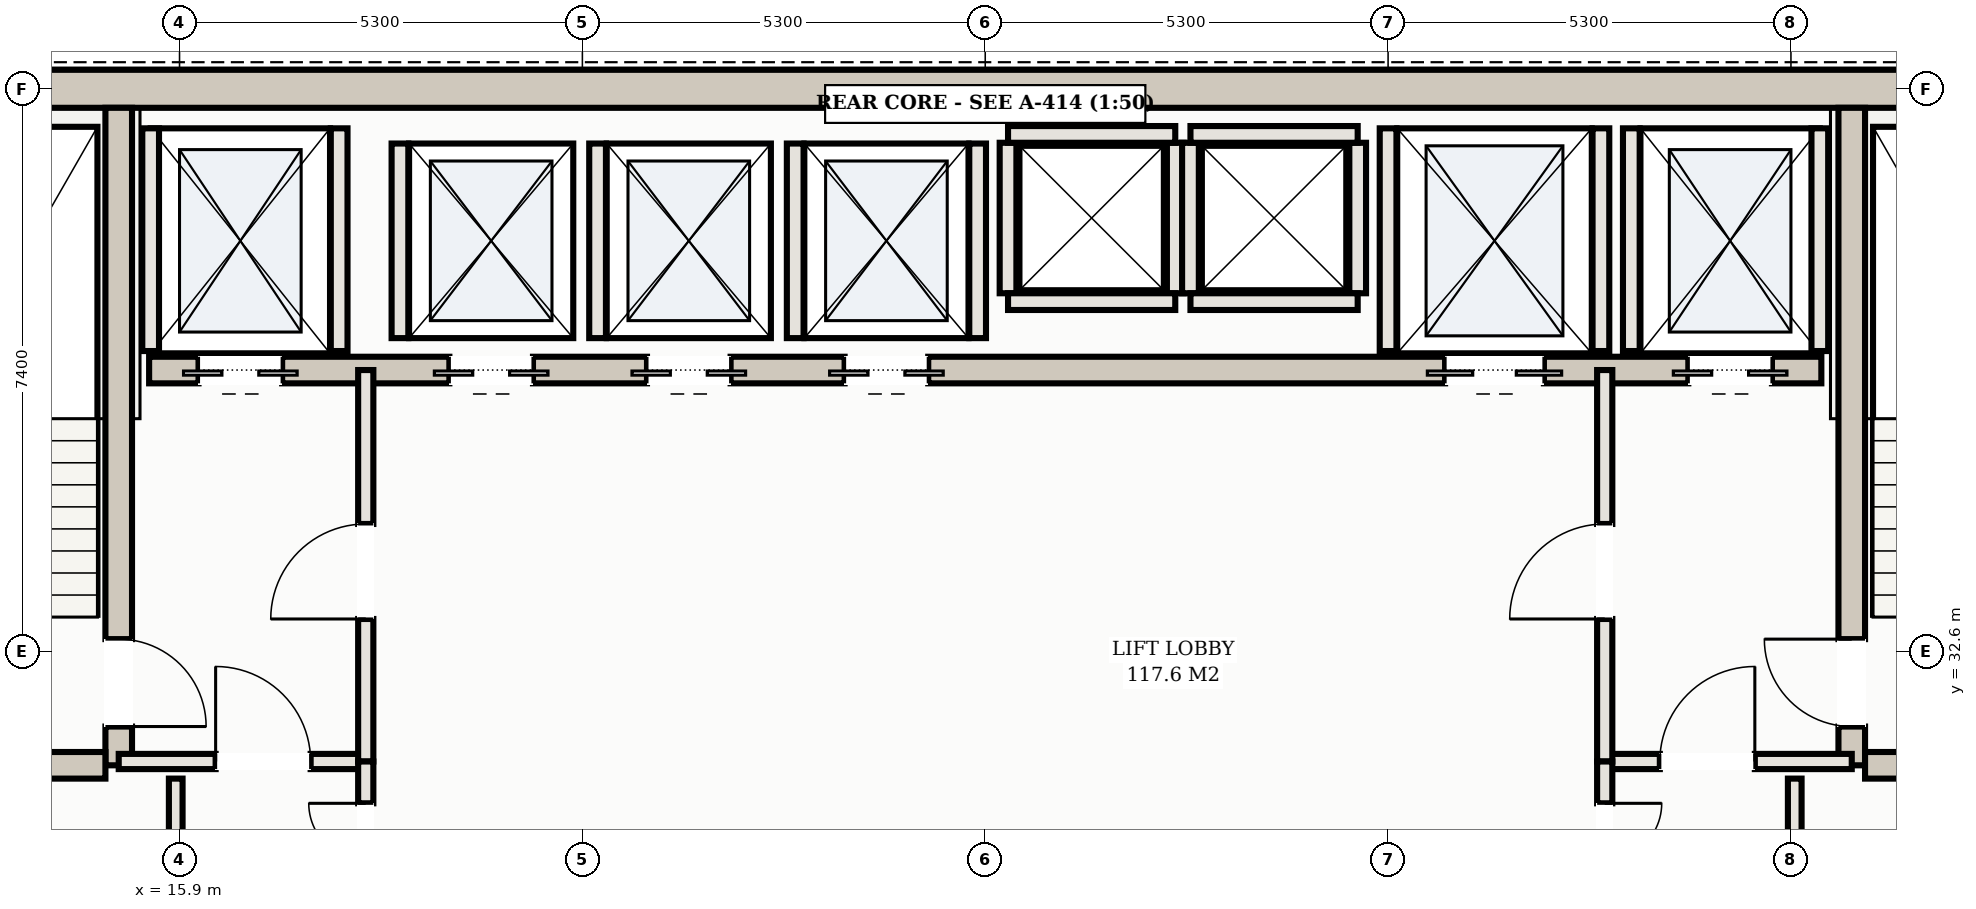
"""IFC4 building model, lengths in metres.
Left out: names, types, materials, properties, quantities, classifications, styles, units other than length and angle.
Written with IfcOpenShell. Run it as: python <this file> out.ifc"""

import sys

from ifc_helpers import new_model, si_unit, direction, frame, frame_2d, origin, place, context, subcontext, project, spatial, rectangle, extrude, element, fill, save


model = new_model("IFC4")
c1 = context("Model", 3, precision=1e-05, world=origin(), true_north=direction((0.0, 1.0)))
c2 = subcontext(c1, "Body", "Model", "MODEL_VIEW")
j1 = project(units=[si_unit("LENGTHUNIT", "METRE"), si_unit("PLANEANGLEUNIT", "RADIAN")], contexts=[c1])
p1 = place(None, origin())
s1 = spatial("IfcSite", under=j1, at=p1, CompositionType="ELEMENT")
p2 = place(p1, origin())
s2 = spatial("IfcBuilding", under=s1, at=p2, CompositionType="ELEMENT")
p3 = place(p2, frame((0.0, 0.0, 259.4)))
s3 = spatial("IfcBuildingStorey", under=s2, at=p3, CompositionType="ELEMENT", Elevation=259.4)
p4 = place(p3, frame((10.35, 40.0, 0.0), z_axis=(0.0, 0.0, 1.0), x_axis=(1.0, 0.0, 0.0)))
e1 = element("IfcWall", 1, at=p4, inside=s3, PredefinedType="SHEAR", context=c2, shape_type="SweptSolid", body=[
    extrude(rectangle(XDim=32.3, YDim=0.5, at=frame_2d((16.15, 0.0))), origin(), (0.0, 0.0, 1.0), 3.11),
])
p5 = place(p3, frame((15.1, 31.1, 0.0), z_axis=(0.0, 0.0, 1.0), x_axis=(0.0, 1.0, 0.0)))
e2 = element("IfcWall", 2, at=p5, inside=s3, PredefinedType="SHEAR", context=c2, shape_type="SweptSolid", body=[
    extrude(rectangle(XDim=8.65, YDim=0.35, at=frame_2d((4.325, 0.0))), origin(), (0.0, 0.0, 1.0), 3.11),
])
p6 = place(p5, frame((0.51, 0.0, 0.0)))
e3 = element("IfcOpeningElement", 3, at=p6, cuts=e2, PredefinedType="OPENING", context=c2, shape_type="SweptSolid", body=[
    extrude(rectangle(XDim=1.15, YDim=2.2, at=frame_2d((0.575, 1.1))), frame((0.0, 0.185, 0.0), z_axis=(0.0, -1.0, 0.0), x_axis=(1.0, 0.0, 0.0)), (0.0, 0.0, 1.0), 0.37),
])
p7 = place(p3, frame((10.85, 31.1, 0.0), z_axis=(0.0, 0.0, 1.0), x_axis=(1.0, 0.0, 0.0)))
e4 = element("IfcWall", 4, at=p7, inside=s3, PredefinedType="SHEAR", context=c2, shape_type="SweptSolid", body=[
    extrude(rectangle(XDim=4.075, YDim=0.35, at=frame_2d((2.038, 0.0))), origin(), (0.0, 0.0, 1.0), 3.11),
])
p8 = place(p3, frame((37.9, 31.1, 0.0), z_axis=(0.0, 0.0, 1.0), x_axis=(0.0, 1.0, 0.0)))
e5 = element("IfcWall", 5, at=p8, inside=s3, PredefinedType="SHEAR", context=c2, shape_type="SweptSolid", body=[
    extrude(rectangle(XDim=8.65, YDim=0.35, at=frame_2d((4.325, 0.0))), origin(), (0.0, 0.0, 1.0), 3.11),
])
p9 = place(p8, frame((0.51, 0.0, 0.0)))
e6 = element("IfcOpeningElement", 6, at=p9, cuts=e5, PredefinedType="OPENING", context=c2, shape_type="SweptSolid", body=[
    extrude(rectangle(XDim=1.15, YDim=2.2, at=frame_2d((0.575, 1.1))), frame((0.0, 0.185, 0.0), z_axis=(0.0, -1.0, 0.0), x_axis=(1.0, 0.0, 0.0)), (0.0, 0.0, 1.0), 0.37),
])
p10 = place(p3, frame((38.075, 31.1, 0.0), z_axis=(0.0, 0.0, 1.0), x_axis=(1.0, 0.0, 0.0)))
e7 = element("IfcWall", 7, at=p10, inside=s3, PredefinedType="SHEAR", context=c2, shape_type="SweptSolid", body=[
    extrude(rectangle(XDim=4.075, YDim=0.35, at=frame_2d((2.038, 0.0))), origin(), (0.0, 0.0, 1.0), 3.11),
])
p11 = place(p3, frame((15.5, 36.3, 0.0), z_axis=(0.0, 0.0, 1.0), x_axis=(1.0, 0.0, 0.0)))
e8 = element("IfcWall", 8, at=p11, inside=s3, PredefinedType="SHEAR", context=c2, shape_type="SweptSolid", body=[
    extrude(rectangle(XDim=22.0, YDim=0.35, at=frame_2d((11.0, 0.0))), origin(), (0.0, 0.0, 1.0), 3.11),
])
p12 = place(p11, frame((0.65, 0.0, 0.0)))
e9 = element("IfcOpeningElement", 9, at=p12, cuts=e8, PredefinedType="OPENING", context=c2, shape_type="SweptSolid", body=[
    extrude(rectangle(XDim=1.1, YDim=2.15, at=frame_2d((0.55, 1.075))), frame((0.0, 0.185, 0.0), z_axis=(0.0, -1.0, 0.0), x_axis=(1.0, 0.0, 0.0)), (0.0, 0.0, 1.0), 0.37),
])
p13 = place(p11, frame((20.25, 0.0, 0.0)))
e10 = element("IfcOpeningElement", 10, at=p13, cuts=e8, PredefinedType="OPENING", context=c2, shape_type="SweptSolid", body=[
    extrude(rectangle(XDim=1.1, YDim=2.15, at=frame_2d((0.55, 1.075))), frame((0.0, 0.185, 0.0), z_axis=(0.0, -1.0, 0.0), x_axis=(1.0, 0.0, 0.0)), (0.0, 0.0, 1.0), 0.37),
])
p14 = place(p11, frame((17.05, 0.0, 0.0)))
e11 = element("IfcOpeningElement", 11, at=p14, cuts=e8, PredefinedType="OPENING", context=c2, shape_type="SweptSolid", body=[
    extrude(rectangle(XDim=1.3, YDim=2.2, at=frame_2d((0.65, 1.1))), frame((0.0, 0.185, 0.0), z_axis=(0.0, -1.0, 0.0), x_axis=(1.0, 0.0, 0.0)), (0.0, 0.0, 1.0), 0.37),
])
p15 = place(p11, frame((3.95, 0.0, 0.0)))
e12 = element("IfcOpeningElement", 12, at=p15, cuts=e8, PredefinedType="OPENING", context=c2, shape_type="SweptSolid", body=[
    extrude(rectangle(XDim=1.1, YDim=2.15, at=frame_2d((0.55, 1.075))), frame((0.0, 0.185, 0.0), z_axis=(0.0, -1.0, 0.0), x_axis=(1.0, 0.0, 0.0)), (0.0, 0.0, 1.0), 0.37),
])
p16 = place(p11, frame((6.55, 0.0, 0.0)))
e13 = element("IfcOpeningElement", 13, at=p16, cuts=e8, PredefinedType="OPENING", context=c2, shape_type="SweptSolid", body=[
    extrude(rectangle(XDim=1.1, YDim=2.15, at=frame_2d((0.55, 1.075))), frame((0.0, 0.185, 0.0), z_axis=(0.0, -1.0, 0.0), x_axis=(1.0, 0.0, 0.0)), (0.0, 0.0, 1.0), 0.37),
])
p17 = place(p11, frame((9.15, 0.0, 0.0)))
e14 = element("IfcOpeningElement", 14, at=p17, cuts=e8, PredefinedType="OPENING", context=c2, shape_type="SweptSolid", body=[
    extrude(rectangle(XDim=1.1, YDim=2.15, at=frame_2d((0.55, 1.075))), frame((0.0, 0.185, 0.0), z_axis=(0.0, -1.0, 0.0), x_axis=(1.0, 0.0, 0.0)), (0.0, 0.0, 1.0), 0.37),
])
for number, where, z_axis, x_axis in (
    (15, (15.52, 36.55, 0.0), (0.0, 0.0, 1.0), (0.0, 1.0, 0.0)),
    (16, (18.0, 36.55, 0.0), (0.0, 0.0, 1.0), (0.0, 1.0, 0.0)),
    (17, (35.0, 36.55, 0.0), (0.0, 0.0, 1.0), (0.0, 1.0, 0.0)),
    (18, (37.48, 36.55, 0.0), (0.0, 0.0, 1.0), (0.0, 1.0, 0.0)),
    (19, (31.8, 36.55, 0.0), (0.0, 0.0, 1.0), (0.0, 1.0, 0.0)),
    (20, (34.6, 36.55, 0.0), (0.0, 0.0, 1.0), (0.0, 1.0, 0.0)),
):
    element("IfcWall", number, at=place(p3, frame(where, z_axis=z_axis, x_axis=x_axis)), inside=s3, PredefinedType="SOLIDWALL", context=c2, shape_type="SweptSolid", body=[
        extrude(rectangle(XDim=2.93, YDim=0.22, at=frame_2d((1.465, 0.0))), origin(), (0.0, 0.0, 1.0), 3.11),
    ])
for number, where, z_axis, x_axis in (
    (21, (18.8, 36.72, 0.0), (0.0, 0.0, 1.0), (0.0, 1.0, 0.0)),
    (22, (21.4, 36.72, 0.0), (0.0, 0.0, 1.0), (0.0, 1.0, 0.0)),
    (23, (24.0, 36.72, 0.0), (0.0, 0.0, 1.0), (0.0, 1.0, 0.0)),
    (24, (26.4, 36.72, 0.0), (0.0, 0.0, 1.0), (0.0, 1.0, 0.0)),
):
    element("IfcWall", number, at=place(p3, frame(where, z_axis=z_axis, x_axis=x_axis)), inside=s3, PredefinedType="SOLIDWALL", context=c2, shape_type="SweptSolid", body=[
        extrude(rectangle(XDim=2.56, YDim=0.22, at=frame_2d((1.28, 0.0))), origin(), (0.0, 0.0, 1.0), 3.11),
    ])
for number, where, z_axis, x_axis in (
    (25, (26.8, 37.31, 0.0), (0.0, 0.0, 1.0), (0.0, 1.0, 0.0)),
    (26, (29.0, 37.31, 0.0), (0.0, 0.0, 1.0), (0.0, 1.0, 0.0)),
):
    element("IfcWall", number, at=place(p3, frame(where, z_axis=z_axis, x_axis=x_axis)), inside=s3, PredefinedType="SOLIDWALL", context=c2, shape_type="SweptSolid", body=[
        extrude(rectangle(XDim=1.98, YDim=0.22, at=frame_2d((0.99, 0.0))), origin(), (0.0, 0.0, 1.0), 3.11),
    ])
for number, where, z_axis, x_axis in (
    (27, (26.8, 39.4, 0.0), (0.0, 0.0, 1.0), (1.0, 0.0, 0.0)),
    (28, (26.8, 37.2, 0.0), (0.0, 0.0, 1.0), (1.0, 0.0, 0.0)),
):
    element("IfcWall", number, at=place(p3, frame(where, z_axis=z_axis, x_axis=x_axis)), inside=s3, PredefinedType="SOLIDWALL", context=c2, shape_type="SweptSolid", body=[
        extrude(rectangle(XDim=2.2, YDim=0.22, at=frame_2d((1.1, 0.0))), origin(), (0.0, 0.0, 1.0), 3.11),
    ])
for number, where, z_axis, x_axis in (
    (29, (29.2, 37.31, 0.0), (0.0, 0.0, 1.0), (0.0, 1.0, 0.0)),
    (30, (31.4, 37.31, 0.0), (0.0, 0.0, 1.0), (0.0, 1.0, 0.0)),
):
    element("IfcWall", number, at=place(p3, frame(where, z_axis=z_axis, x_axis=x_axis)), inside=s3, PredefinedType="SOLIDWALL", context=c2, shape_type="SweptSolid", body=[
        extrude(rectangle(XDim=1.98, YDim=0.22, at=frame_2d((0.99, 0.0))), origin(), (0.0, 0.0, 1.0), 3.11),
    ])
for number, where, z_axis, x_axis in (
    (31, (29.2, 39.4, 0.0), (0.0, 0.0, 1.0), (1.0, 0.0, 0.0)),
    (32, (29.2, 37.2, 0.0), (0.0, 0.0, 1.0), (1.0, 0.0, 0.0)),
):
    element("IfcWall", number, at=place(p3, frame(where, z_axis=z_axis, x_axis=x_axis)), inside=s3, PredefinedType="SOLIDWALL", context=c2, shape_type="SweptSolid", body=[
        extrude(rectangle(XDim=2.2, YDim=0.22, at=frame_2d((1.1, 0.0))), origin(), (0.0, 0.0, 1.0), 3.11),
    ])
p18 = place(p3, frame((15.1, 31.15, 0.0), z_axis=(0.0, 0.0, 1.0), x_axis=(1.0, 0.0, 0.0)))
e33 = element("IfcWall", 33, at=p18, inside=s3, PredefinedType="PARTITIONING", context=c2, shape_type="SweptSolid", body=[
    extrude(rectangle(XDim=3.25, YDim=0.2, at=frame_2d((1.625, 0.0))), origin(), (0.0, 0.0, 1.0), 2.45),
])
p19 = place(p18, frame((1.275, 0.0, 0.0)))
e34 = element("IfcOpeningElement", 34, at=p19, cuts=e33, PredefinedType="OPENING", context=c2, shape_type="SweptSolid", body=[
    extrude(rectangle(XDim=1.25, YDim=2.2, at=frame_2d((0.625, 1.1))), frame((0.0, 0.11, 0.0), z_axis=(0.0, -1.0, 0.0), x_axis=(1.0, 0.0, 0.0)), (0.0, 0.0, 1.0), 0.22),
])
p20 = place(p3, frame((18.35, 31.15, 0.0), z_axis=(0.0, 0.0, 1.0), x_axis=(0.0, 1.0, 0.0)))
e35 = element("IfcWall", 35, at=p20, inside=s3, PredefinedType="PARTITIONING", context=c2, shape_type="SweptSolid", body=[
    extrude(rectangle(XDim=5.15, YDim=0.2, at=frame_2d((2.575, 0.0))), origin(), (0.0, 0.0, 1.0), 2.45),
])
p21 = place(p20, frame((1.875, 0.0, 0.0)))
e36 = element("IfcOpeningElement", 36, at=p21, cuts=e35, PredefinedType="OPENING", context=c2, shape_type="SweptSolid", body=[
    extrude(rectangle(XDim=1.25, YDim=2.2, at=frame_2d((0.625, 1.1))), frame((0.0, 0.11, 0.0), z_axis=(0.0, -1.0, 0.0), x_axis=(1.0, 0.0, 0.0)), (0.0, 0.0, 1.0), 0.22),
])
p22 = place(p3, frame((34.65, 31.15, 0.0), z_axis=(0.0, 0.0, 1.0), x_axis=(1.0, 0.0, 0.0)))
e37 = element("IfcWall", 37, at=p22, inside=s3, PredefinedType="PARTITIONING", context=c2, shape_type="SweptSolid", body=[
    extrude(rectangle(XDim=3.25, YDim=0.2, at=frame_2d((1.625, 0.0))), origin(), (0.0, 0.0, 1.0), 2.45),
])
p23 = place(p22, frame((0.725, 0.0, 0.0)))
e38 = element("IfcOpeningElement", 38, at=p23, cuts=e37, PredefinedType="OPENING", context=c2, shape_type="SweptSolid", body=[
    extrude(rectangle(XDim=1.25, YDim=2.2, at=frame_2d((0.625, 1.1))), frame((0.0, 0.11, 0.0), z_axis=(0.0, -1.0, 0.0), x_axis=(1.0, 0.0, 0.0)), (0.0, 0.0, 1.0), 0.22),
])
p24 = place(p3, frame((34.65, 31.15, 0.0), z_axis=(0.0, 0.0, 1.0), x_axis=(0.0, 1.0, 0.0)))
e39 = element("IfcWall", 39, at=p24, inside=s3, PredefinedType="PARTITIONING", context=c2, shape_type="SweptSolid", body=[
    extrude(rectangle(XDim=5.15, YDim=0.2, at=frame_2d((2.575, 0.0))), origin(), (0.0, 0.0, 1.0), 2.45),
])
p25 = place(p24, frame((1.875, 0.0, 0.0)))
e40 = element("IfcOpeningElement", 40, at=p25, cuts=e39, PredefinedType="OPENING", context=c2, shape_type="SweptSolid", body=[
    extrude(rectangle(XDim=1.25, YDim=2.2, at=frame_2d((0.625, 1.1))), frame((0.0, 0.11, 0.0), z_axis=(0.0, -1.0, 0.0), x_axis=(1.0, 0.0, 0.0)), (0.0, 0.0, 1.0), 0.22),
])
p26 = place(p3, frame((15.85, 25.45, 0.0), z_axis=(0.0, 0.0, 1.0), x_axis=(0.0, 1.0, 0.0)))
e41 = element("IfcWall", 41, at=p26, inside=s3, PredefinedType="PARTITIONING", context=c2, shape_type="SweptSolid", body=[
    extrude(rectangle(XDim=5.475, YDim=0.18, at=frame_2d((2.738, 0.0))), origin(), (0.0, 0.0, 1.0), 2.45),
])
p27 = place(p26, frame((2.277, 0.0, 0.0)))
e42 = element("IfcOpeningElement", 42, at=p27, cuts=e41, PredefinedType="OPENING", context=c2, shape_type="SweptSolid", body=[
    extrude(rectangle(XDim=0.92, YDim=2.15, at=frame_2d((0.46, 1.075))), frame((0.0, 0.1, 0.0), z_axis=(0.0, -1.0, 0.0), x_axis=(1.0, 0.0, 0.0)), (0.0, 0.0, 1.0), 0.2),
])
p28 = place(p3, frame((37.15, 25.45, 0.0), z_axis=(0.0, 0.0, 1.0), x_axis=(0.0, 1.0, 0.0)))
e43 = element("IfcWall", 43, at=p28, inside=s3, PredefinedType="PARTITIONING", context=c2, shape_type="SweptSolid", body=[
    extrude(rectangle(XDim=5.475, YDim=0.18, at=frame_2d((2.738, 0.0))), origin(), (0.0, 0.0, 1.0), 2.45),
])
p29 = place(p28, frame((0.765, 0.0, 0.0)))
e44 = element("IfcOpeningElement", 44, at=p29, cuts=e43, PredefinedType="OPENING", context=c2, shape_type="SweptSolid", body=[
    extrude(rectangle(XDim=0.92, YDim=2.15, at=frame_2d((0.46, 1.075))), frame((0.0, 0.1, 0.0), z_axis=(0.0, -1.0, 0.0), x_axis=(1.0, 0.0, 0.0)), (0.0, 0.0, 1.0), 0.2),
])
p30 = place(p28, frame((3.452, 0.0, 0.0)))
e45 = element("IfcOpeningElement", 45, at=p30, cuts=e43, PredefinedType="OPENING", context=c2, shape_type="SweptSolid", body=[
    extrude(rectangle(XDim=0.92, YDim=2.15, at=frame_2d((0.46, 1.075))), frame((0.0, 0.1, 0.0), z_axis=(0.0, -1.0, 0.0), x_axis=(1.0, 0.0, 0.0)), (0.0, 0.0, 1.0), 0.2),
])
p31 = place(p3, frame((18.35, 28.55, 0.0), z_axis=(0.0, 0.0, 1.0), x_axis=(0.0, 1.0, 0.0)))
e46 = element("IfcWall", 46, at=p31, inside=s3, PredefinedType="PARTITIONING", context=c2, shape_type="SweptSolid", body=[
    extrude(rectangle(XDim=2.6, YDim=0.2, at=frame_2d((1.3, 0.0))), origin(), (0.0, 0.0, 1.0), 2.45),
])
p32 = place(p31, frame((0.55, 0.0, 0.0)))
e47 = element("IfcOpeningElement", 47, at=p32, cuts=e46, PredefinedType="OPENING", context=c2, shape_type="SweptSolid", body=[
    extrude(rectangle(XDim=1.5, YDim=2.25, at=frame_2d((0.75, 1.125))), frame((0.0, 0.11, 0.0), z_axis=(0.0, -1.0, 0.0), x_axis=(1.0, 0.0, 0.0)), (0.0, 0.0, 1.0), 0.22),
])
p33 = place(p3, frame((34.65, 28.55, 0.0), z_axis=(0.0, 0.0, 1.0), x_axis=(0.0, 1.0, 0.0)))
e48 = element("IfcWall", 48, at=p33, inside=s3, PredefinedType="PARTITIONING", context=c2, shape_type="SweptSolid", body=[
    extrude(rectangle(XDim=2.6, YDim=0.2, at=frame_2d((1.3, 0.0))), origin(), (0.0, 0.0, 1.0), 2.45),
])
p34 = place(p33, frame((0.55, 0.0, 0.0)))
e49 = element("IfcOpeningElement", 49, at=p34, cuts=e48, PredefinedType="OPENING", context=c2, shape_type="SweptSolid", body=[
    extrude(rectangle(XDim=1.5, YDim=2.25, at=frame_2d((0.75, 1.125))), frame((0.0, 0.11, 0.0), z_axis=(0.0, -1.0, 0.0), x_axis=(1.0, 0.0, 0.0)), (0.0, 0.0, 1.0), 0.22),
])
p35 = place(p12, frame((1.1, 0.0, 0.0), z_axis=(0.0, 0.0, 1.0), x_axis=(-1.0, 0.0, 0.0)))
e50 = element("IfcDoor", 50, at=p35, inside=s3, OperationType="DOUBLE_DOOR_SLIDING", PredefinedType="DOOR", context=c2, shape_type="SweptSolid", body=[
    extrude(rectangle(XDim=1.1, YDim=2.15, at=frame_2d((0.55, 1.075))), frame((0.0, 0.025, 0.0), z_axis=(0.0, -1.0, 0.0), x_axis=(1.0, 0.0, 0.0)), (0.0, 0.0, 1.0), 0.05),
])
fill(e9, e50)
p36 = place(p13, frame((1.1, 0.0, 0.0), z_axis=(0.0, 0.0, 1.0), x_axis=(-1.0, 0.0, 0.0)))
e51 = element("IfcDoor", 51, at=p36, inside=s3, OperationType="DOUBLE_DOOR_SLIDING", PredefinedType="DOOR", context=c2, shape_type="SweptSolid", body=[
    extrude(rectangle(XDim=1.1, YDim=2.15, at=frame_2d((0.55, 1.075))), frame((0.0, 0.025, 0.0), z_axis=(0.0, -1.0, 0.0), x_axis=(1.0, 0.0, 0.0)), (0.0, 0.0, 1.0), 0.05),
])
fill(e10, e51)
p37 = place(p14, frame((1.3, 0.0, 0.0), z_axis=(0.0, 0.0, 1.0), x_axis=(-1.0, 0.0, 0.0)))
e52 = element("IfcDoor", 52, at=p37, inside=s3, OperationType="DOUBLE_DOOR_SLIDING", PredefinedType="DOOR", context=c2, shape_type="SweptSolid", body=[
    extrude(rectangle(XDim=1.3, YDim=2.2, at=frame_2d((0.65, 1.1))), frame((0.0, 0.025, 0.0), z_axis=(0.0, -1.0, 0.0), x_axis=(1.0, 0.0, 0.0)), (0.0, 0.0, 1.0), 0.05),
])
fill(e11, e52)
p38 = place(p15, frame((1.1, 0.0, 0.0), z_axis=(0.0, 0.0, 1.0), x_axis=(-1.0, 0.0, 0.0)))
e53 = element("IfcDoor", 53, at=p38, inside=s3, OperationType="DOUBLE_DOOR_SLIDING", PredefinedType="DOOR", context=c2, shape_type="SweptSolid", body=[
    extrude(rectangle(XDim=1.1, YDim=2.15, at=frame_2d((0.55, 1.075))), frame((0.0, 0.025, 0.0), z_axis=(0.0, -1.0, 0.0), x_axis=(1.0, 0.0, 0.0)), (0.0, 0.0, 1.0), 0.05),
])
fill(e12, e53)
p39 = place(p16, frame((1.1, 0.0, 0.0), z_axis=(0.0, 0.0, 1.0), x_axis=(-1.0, 0.0, 0.0)))
e54 = element("IfcDoor", 54, at=p39, inside=s3, OperationType="DOUBLE_DOOR_SLIDING", PredefinedType="DOOR", context=c2, shape_type="SweptSolid", body=[
    extrude(rectangle(XDim=1.1, YDim=2.15, at=frame_2d((0.55, 1.075))), frame((0.0, 0.025, 0.0), z_axis=(0.0, -1.0, 0.0), x_axis=(1.0, 0.0, 0.0)), (0.0, 0.0, 1.0), 0.05),
])
fill(e13, e54)
p40 = place(p17, frame((1.1, 0.0, 0.0), z_axis=(0.0, 0.0, 1.0), x_axis=(-1.0, 0.0, 0.0)))
e55 = element("IfcDoor", 55, at=p40, inside=s3, OperationType="DOUBLE_DOOR_SLIDING", PredefinedType="DOOR", context=c2, shape_type="SweptSolid", body=[
    extrude(rectangle(XDim=1.1, YDim=2.15, at=frame_2d((0.55, 1.075))), frame((0.0, 0.025, 0.0), z_axis=(0.0, -1.0, 0.0), x_axis=(1.0, 0.0, 0.0)), (0.0, 0.0, 1.0), 0.05),
])
fill(e14, e55)
p41 = place(p19, origin())
e56 = element("IfcDoor", 56, at=p41, inside=s3, OperationType="SINGLE_SWING_LEFT", PredefinedType="DOOR", context=c2, shape_type="SweptSolid", body=[
    extrude(rectangle(XDim=1.25, YDim=2.2, at=frame_2d((0.625, 1.1))), frame((0.0, 0.025, 0.0), z_axis=(0.0, -1.0, 0.0), x_axis=(1.0, 0.0, 0.0)), (0.0, 0.0, 1.0), 0.05),
])
fill(e34, e56)
p42 = place(p21, origin())
e57 = element("IfcDoor", 57, at=p42, inside=s3, OperationType="SINGLE_SWING_LEFT", PredefinedType="DOOR", context=c2, shape_type="SweptSolid", body=[
    extrude(rectangle(XDim=1.25, YDim=2.2, at=frame_2d((0.625, 1.1))), frame((0.0, 0.025, 0.0), z_axis=(0.0, -1.0, 0.0), x_axis=(1.0, 0.0, 0.0)), (0.0, 0.0, 1.0), 0.05),
])
fill(e36, e57)
p43 = place(p23, origin())
e58 = element("IfcDoor", 58, at=p43, inside=s3, OperationType="SINGLE_SWING_RIGHT", PredefinedType="DOOR", context=c2, shape_type="SweptSolid", body=[
    extrude(rectangle(XDim=1.25, YDim=2.2, at=frame_2d((0.625, 1.1))), frame((0.0, 0.025, 0.0), z_axis=(0.0, -1.0, 0.0), x_axis=(1.0, 0.0, 0.0)), (0.0, 0.0, 1.0), 0.05),
])
fill(e38, e58)
p44 = place(p25, origin())
e59 = element("IfcDoor", 59, at=p44, inside=s3, OperationType="SINGLE_SWING_LEFT", PredefinedType="DOOR", context=c2, shape_type="SweptSolid", body=[
    extrude(rectangle(XDim=1.25, YDim=2.2, at=frame_2d((0.625, 1.1))), frame((0.0, 0.025, 0.0), z_axis=(0.0, -1.0, 0.0), x_axis=(1.0, 0.0, 0.0)), (0.0, 0.0, 1.0), 0.05),
])
fill(e40, e59)
p45 = place(p6, frame((1.15, 0.0, 0.0), z_axis=(0.0, 0.0, 1.0), x_axis=(-1.0, 0.0, 0.0)))
e60 = element("IfcDoor", 60, at=p45, inside=s3, OperationType="SINGLE_SWING_RIGHT", PredefinedType="DOOR", context=c2, shape_type="SweptSolid", body=[
    extrude(rectangle(XDim=1.15, YDim=2.2, at=frame_2d((0.575, 1.1))), frame((0.0, 0.025, 0.0), z_axis=(0.0, -1.0, 0.0), x_axis=(1.0, 0.0, 0.0)), (0.0, 0.0, 1.0), 0.05),
])
fill(e3, e60)
p46 = place(p9, origin())
e61 = element("IfcDoor", 61, at=p46, inside=s3, OperationType="SINGLE_SWING_RIGHT", PredefinedType="DOOR", context=c2, shape_type="SweptSolid", body=[
    extrude(rectangle(XDim=1.15, YDim=2.2, at=frame_2d((0.575, 1.1))), frame((0.0, 0.025, 0.0), z_axis=(0.0, -1.0, 0.0), x_axis=(1.0, 0.0, 0.0)), (0.0, 0.0, 1.0), 0.05),
])
fill(e6, e61)
p47 = place(p32, origin())
e62 = element("IfcDoor", 62, at=p47, inside=s3, OperationType="DOUBLE_DOOR_SINGLE_SWING", PredefinedType="DOOR", context=c2, shape_type="SweptSolid", body=[
    extrude(rectangle(XDim=1.5, YDim=2.25, at=frame_2d((0.75, 1.125))), frame((0.0, 0.025, 0.0), z_axis=(0.0, -1.0, 0.0), x_axis=(1.0, 0.0, 0.0)), (0.0, 0.0, 1.0), 0.05),
])
fill(e47, e62)
p48 = place(p34, frame((1.5, 0.0, 0.0), z_axis=(0.0, 0.0, 1.0), x_axis=(-1.0, 0.0, 0.0)))
e63 = element("IfcDoor", 63, at=p48, inside=s3, OperationType="DOUBLE_DOOR_SINGLE_SWING", PredefinedType="DOOR", context=c2, shape_type="SweptSolid", body=[
    extrude(rectangle(XDim=1.5, YDim=2.25, at=frame_2d((0.75, 1.125))), frame((0.0, 0.025, 0.0), z_axis=(0.0, -1.0, 0.0), x_axis=(1.0, 0.0, 0.0)), (0.0, 0.0, 1.0), 0.05),
])
fill(e49, e63)
save(model, sys.argv[1])
